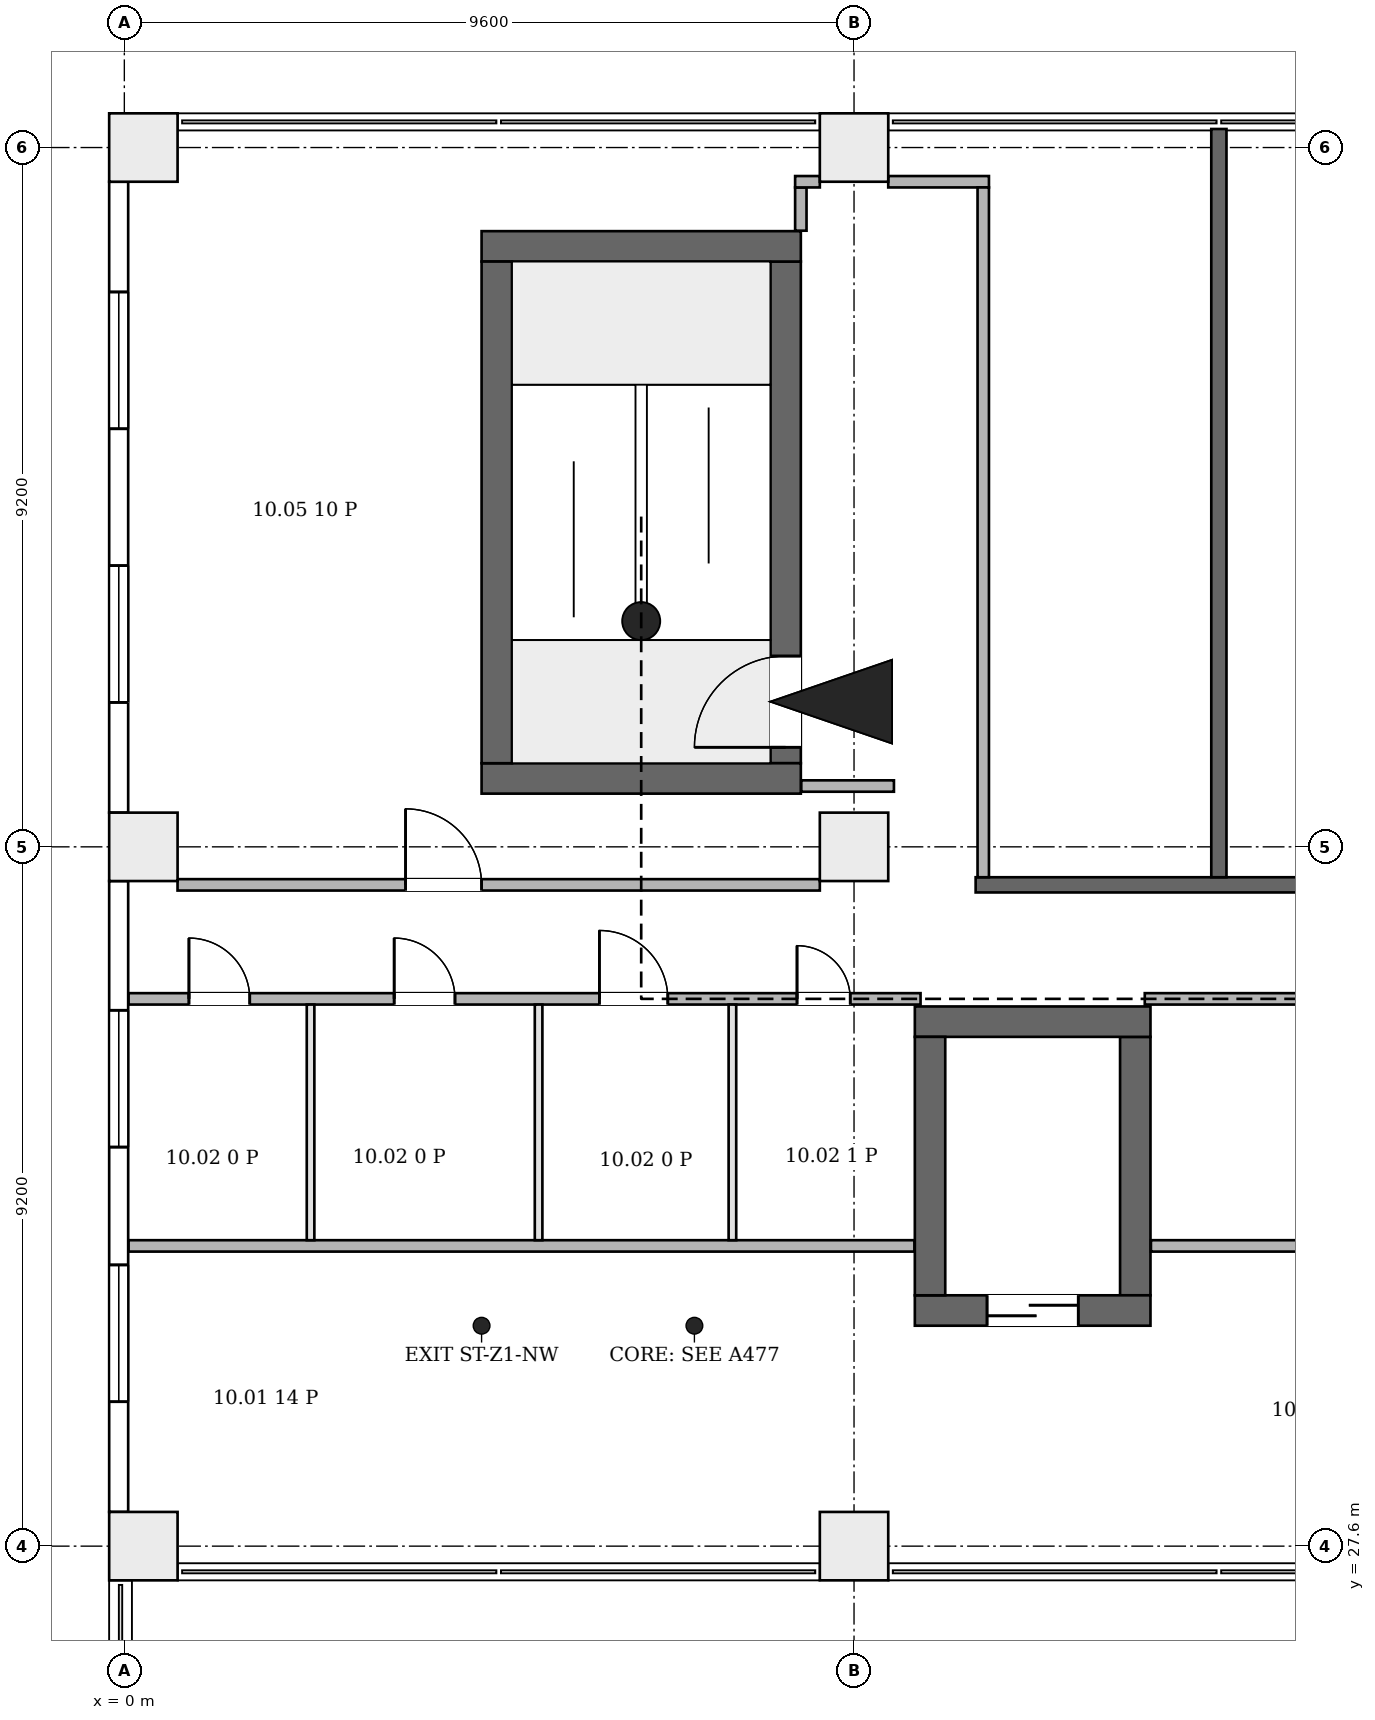
"""IFC4 building model, lengths in metres.
Left out: names, types, materials, properties, quantities, classifications, styles, units other than length and angle.
Written with IfcOpenShell. Run it as: python <this file> out.ifc"""

import sys

from ifc_helpers import new_model, si_unit, direction, frame, frame_2d, origin, origin_2d, place, context, subcontext, project, spatial, rectangle, extrude, element, fill, save


model = new_model("IFC4")
c1 = context("Model", 3, precision=1e-05, world=origin(), true_north=direction((0.0, 1.0)))
c2 = subcontext(c1, "Body", "Model", "MODEL_VIEW")
j1 = project(units=[si_unit("LENGTHUNIT", "METRE"), si_unit("PLANEANGLEUNIT", "RADIAN")], contexts=[c1])
p1 = place(None, origin())
s1 = spatial("IfcSite", under=j1, at=p1, CompositionType="ELEMENT")
p2 = place(p1, origin())
s2 = spatial("IfcBuilding", under=s1, at=p2, CompositionType="ELEMENT")
p3 = place(p2, frame((0.0, 0.0, 52.9)))
s3 = spatial("IfcBuildingStorey", under=s2, at=p3, CompositionType="ELEMENT", Elevation=52.9)
for number, where, z_axis, x_axis in (
    (1, (4.7, 37.7, 0.0), (0.0, 0.0, 1.0), (1.0, 0.0, 0.0)),
    (2, (4.7, 44.7, 0.0), (0.0, 0.0, 1.0), (1.0, 0.0, 0.0)),
):
    element("IfcWall", number, at=place(p3, frame(where, z_axis=z_axis, x_axis=x_axis)), inside=s3, PredefinedType="SHEAR", context=c2, shape_type="SweptSolid", body=[
        extrude(rectangle(XDim=4.2, YDim=0.4, at=frame_2d((2.1, 0.0))), origin(), (0.0, 0.0, 1.0), 4.2),
    ])
p4 = place(p3, frame((4.9, 37.9, 0.0), z_axis=(0.0, 0.0, 1.0), x_axis=(0.0, 1.0, 0.0)))
e3 = element("IfcWall", 3, at=p4, inside=s3, PredefinedType="SHEAR", context=c2, shape_type="SweptSolid", body=[
    extrude(rectangle(XDim=6.6, YDim=0.4, at=frame_2d((3.3, 0.0))), origin(), (0.0, 0.0, 1.0), 4.2),
])
p5 = place(p3, frame((8.7, 37.9, 0.0), z_axis=(0.0, 0.0, 1.0), x_axis=(0.0, 1.0, 0.0)))
e4 = element("IfcWall", 4, at=p5, inside=s3, PredefinedType="SHEAR", context=c2, shape_type="SweptSolid", body=[
    extrude(rectangle(XDim=6.6, YDim=0.4, at=frame_2d((3.3, 0.0))), origin(), (0.0, 0.0, 1.0), 4.2),
])
p6 = place(p5, frame((0.21, 0.0, 0.0)))
e5 = element("IfcOpeningElement", 5, at=p6, cuts=e4, PredefinedType="OPENING", context=c2, shape_type="SweptSolid", body=[
    extrude(rectangle(XDim=1.2, YDim=2.1, at=frame_2d((0.6, 1.05))), frame((0.0, 0.21, 0.0), z_axis=(0.0, -1.0, 0.0), x_axis=(1.0, 0.0, 0.0)), (0.0, 0.0, 1.0), 0.42),
])
p7 = place(p3, frame((10.4, 30.7, 0.0), z_axis=(0.0, 0.0, 1.0), x_axis=(1.0, 0.0, 0.0)))
e6 = element("IfcWall", 6, at=p7, inside=s3, PredefinedType="SHEAR", context=c2, shape_type="SweptSolid", body=[
    extrude(rectangle(XDim=3.1, YDim=0.4, at=frame_2d((1.55, 0.0))), origin(), (0.0, 0.0, 1.0), 4.2),
])
p8 = place(p7, frame((0.95, 0.0, 0.0)))
e7 = element("IfcOpeningElement", 7, at=p8, cuts=e6, PredefinedType="OPENING", context=c2, shape_type="SweptSolid", body=[
    extrude(rectangle(XDim=1.2, YDim=2.1, at=frame_2d((0.6, 1.05))), frame((0.0, 0.21, 0.0), z_axis=(0.0, -1.0, 0.0), x_axis=(1.0, 0.0, 0.0)), (0.0, 0.0, 1.0), 0.42),
])
p9 = place(p3, frame((10.4, 34.5, 0.0), z_axis=(0.0, 0.0, 1.0), x_axis=(1.0, 0.0, 0.0)))
e8 = element("IfcWall", 8, at=p9, inside=s3, PredefinedType="SHEAR", context=c2, shape_type="SweptSolid", body=[
    extrude(rectangle(XDim=3.1, YDim=0.4, at=frame_2d((1.55, 0.0))), origin(), (0.0, 0.0, 1.0), 4.2),
])
for number, where, z_axis, x_axis in (
    (9, (10.6, 30.9, 0.0), (0.0, 0.0, 1.0), (0.0, 1.0, 0.0)),
    (10, (13.3, 30.9, 0.0), (0.0, 0.0, 1.0), (0.0, 1.0, 0.0)),
):
    element("IfcWall", number, at=place(p3, frame(where, z_axis=z_axis, x_axis=x_axis)), inside=s3, PredefinedType="SHEAR", context=c2, shape_type="SweptSolid", body=[
        extrude(rectangle(XDim=3.4, YDim=0.4, at=frame_2d((1.7, 0.0))), origin(), (0.0, 0.0, 1.0), 4.2),
    ])
for number, where, z_axis, x_axis in (
    (11, (0.25, 27.6, 0.0), (0.0, 0.0, 1.0), (1.0, 0.0, 0.0)),
    (12, (9.6, 27.6, 0.0), (0.0, 0.0, 1.0), (1.0, 0.0, 0.0)),
    (13, (0.25, 36.8, 0.0), (0.0, 0.0, 1.0), (1.0, 0.0, 0.0)),
    (14, (9.6, 36.8, 0.0), (0.0, 0.0, 1.0), (1.0, 0.0, 0.0)),
    (15, (0.25, 46.0, 0.0), (0.0, 0.0, 1.0), (1.0, 0.0, 0.0)),
    (16, (9.6, 46.0, 0.0), (0.0, 0.0, 1.0), (1.0, 0.0, 0.0)),
):
    element("IfcColumn", number, at=place(p3, frame(where, z_axis=z_axis, x_axis=x_axis)), inside=s3, PredefinedType="COLUMN", context=c2, shape_type="SweptSolid", body=[
        extrude(rectangle(XDim=0.9, YDim=0.9, at=origin_2d()), origin(), (0.0, 0.0, 1.0), 4.2),
    ])
p10 = place(p3, frame((-0.074, 36.35, 0.0), z_axis=(0.0, 0.0, 1.0), x_axis=(0.0, -1.0, 0.0)))
e17 = element("IfcWall", 17, at=p10, inside=s3, PredefinedType="ELEMENTEDWALL", context=c2, shape_type="SweptSolid", body=[
    extrude(rectangle(XDim=8.3, YDim=0.25, at=frame_2d((4.15, 0.0))), origin(), (0.0, 0.0, 1.0), 3.9),
])
p11 = place(p10, frame((5.05, 0.0, 0.9)))
e18 = element("IfcOpeningElement", 18, at=p11, cuts=e17, PredefinedType="OPENING", context=c2, shape_type="SweptSolid", body=[
    extrude(rectangle(XDim=1.8, YDim=2.6, at=frame_2d((0.9, 1.3))), frame((0.0, 0.135, 0.0), z_axis=(0.0, -1.0, 0.0), x_axis=(1.0, 0.0, 0.0)), (0.0, 0.0, 1.0), 0.27),
])
p12 = place(p10, frame((1.7, 0.0, 0.9)))
e19 = element("IfcOpeningElement", 19, at=p12, cuts=e17, PredefinedType="OPENING", context=c2, shape_type="SweptSolid", body=[
    extrude(rectangle(XDim=1.8, YDim=2.6, at=frame_2d((0.9, 1.3))), frame((0.0, 0.135, 0.0), z_axis=(0.0, -1.0, 0.0), x_axis=(1.0, 0.0, 0.0)), (0.0, 0.0, 1.0), 0.27),
])
p13 = place(p3, frame((-0.074, 45.55, 0.0), z_axis=(0.0, 0.0, 1.0), x_axis=(0.0, -1.0, 0.0)))
e20 = element("IfcWall", 20, at=p13, inside=s3, PredefinedType="ELEMENTEDWALL", context=c2, shape_type="SweptSolid", body=[
    extrude(rectangle(XDim=8.3, YDim=0.25, at=frame_2d((4.15, 0.0))), origin(), (0.0, 0.0, 1.0), 3.9),
])
p14 = place(p13, frame((5.05, 0.0, 0.9)))
e21 = element("IfcOpeningElement", 21, at=p14, cuts=e20, PredefinedType="OPENING", context=c2, shape_type="SweptSolid", body=[
    extrude(rectangle(XDim=1.8, YDim=2.6, at=frame_2d((0.9, 1.3))), frame((0.0, 0.135, 0.0), z_axis=(0.0, -1.0, 0.0), x_axis=(1.0, 0.0, 0.0)), (0.0, 0.0, 1.0), 0.27),
])
p15 = place(p13, frame((1.45, 0.0, 0.9)))
e22 = element("IfcOpeningElement", 22, at=p15, cuts=e20, PredefinedType="OPENING", context=c2, shape_type="SweptSolid", body=[
    extrude(rectangle(XDim=1.8, YDim=2.6, at=frame_2d((0.9, 1.3))), frame((0.0, 0.135, 0.0), z_axis=(0.0, -1.0, 0.0), x_axis=(1.0, 0.0, 0.0)), (0.0, 0.0, 1.0), 0.27),
])
p16 = place(p3, frame((0.056, 31.55, 0.0), z_axis=(0.0, 0.0, 1.0), x_axis=(1.0, 0.0, 0.0)))
e23 = element("IfcWall", 23, at=p16, inside=s3, PredefinedType="PARTITIONING", context=c2, shape_type="SweptSolid", body=[
    extrude(rectangle(XDim=10.338, YDim=0.15, at=frame_2d((5.169, 0.0))), origin(), (0.0, 0.0, 1.0), 3.9),
])
p17 = place(p3, frame((0.056, 34.8, 0.0), z_axis=(0.0, 0.0, 1.0), x_axis=(1.0, 0.0, 0.0)))
e24 = element("IfcWall", 24, at=p17, inside=s3, PredefinedType="PARTITIONING", context=c2, shape_type="SweptSolid", body=[
    extrude(rectangle(XDim=10.419, YDim=0.15, at=frame_2d((5.209, 0.0))), origin(), (0.0, 0.0, 1.0), 3.9),
])
p18 = place(p17, frame((0.794, 0.0, 0.0)))
e25 = element("IfcOpeningElement", 25, at=p18, cuts=e24, PredefinedType="OPENING", context=c2, shape_type="SweptSolid", body=[
    extrude(rectangle(XDim=0.8, YDim=2.1, at=frame_2d((0.4, 1.05))), frame((0.0, 0.085, 0.0), z_axis=(0.0, -1.0, 0.0), x_axis=(1.0, 0.0, 0.0)), (0.0, 0.0, 1.0), 0.17),
])
p19 = place(p17, frame((3.494, 0.0, 0.0)))
e26 = element("IfcOpeningElement", 26, at=p19, cuts=e24, PredefinedType="OPENING", context=c2, shape_type="SweptSolid", body=[
    extrude(rectangle(XDim=0.8, YDim=2.1, at=frame_2d((0.4, 1.05))), frame((0.0, 0.085, 0.0), z_axis=(0.0, -1.0, 0.0), x_axis=(1.0, 0.0, 0.0)), (0.0, 0.0, 1.0), 0.17),
])
p20 = place(p17, frame((6.194, 0.0, 0.0)))
e27 = element("IfcOpeningElement", 27, at=p20, cuts=e24, PredefinedType="OPENING", context=c2, shape_type="SweptSolid", body=[
    extrude(rectangle(XDim=0.9, YDim=2.1, at=frame_2d((0.45, 1.05))), frame((0.0, 0.085, 0.0), z_axis=(0.0, -1.0, 0.0), x_axis=(1.0, 0.0, 0.0)), (0.0, 0.0, 1.0), 0.17),
])
p21 = place(p17, frame((8.794, 0.0, 0.0)))
e28 = element("IfcOpeningElement", 28, at=p21, cuts=e24, PredefinedType="OPENING", context=c2, shape_type="SweptSolid", body=[
    extrude(rectangle(XDim=0.7, YDim=2.1, at=frame_2d((0.35, 1.05))), frame((0.0, 0.085, 0.0), z_axis=(0.0, -1.0, 0.0), x_axis=(1.0, 0.0, 0.0)), (0.0, 0.0, 1.0), 0.17),
])
p22 = place(p3, frame((0.7, 36.3, 0.0), z_axis=(0.0, 0.0, 1.0), x_axis=(1.0, 0.0, 0.0)))
e29 = element("IfcWall", 29, at=p22, inside=s3, PredefinedType="PARTITIONING", context=c2, shape_type="SweptSolid", body=[
    extrude(rectangle(XDim=8.45, YDim=0.15, at=frame_2d((4.225, 0.0))), origin(), (0.0, 0.0, 1.0), 3.9),
])
p23 = place(p22, frame((3.0, 0.0, 0.0)))
e30 = element("IfcOpeningElement", 30, at=p23, cuts=e29, PredefinedType="OPENING", context=c2, shape_type="SweptSolid", body=[
    extrude(rectangle(XDim=1.0, YDim=2.1, at=frame_2d((0.5, 1.05))), frame((0.0, 0.085, 0.0), z_axis=(0.0, -1.0, 0.0), x_axis=(1.0, 0.0, 0.0)), (0.0, 0.0, 1.0), 0.17),
])
for number, where, z_axis, x_axis in (
    (31, (2.45, 31.625, 0.0), (0.0, 0.0, 1.0), (0.0, 1.0, 0.0)),
    (32, (5.45, 31.625, 0.0), (0.0, 0.0, 1.0), (0.0, 1.0, 0.0)),
    (33, (8.0, 31.625, 0.0), (0.0, 0.0, 1.0), (0.0, 1.0, 0.0)),
):
    element("IfcWall", number, at=place(p3, frame(where, z_axis=z_axis, x_axis=x_axis)), inside=s3, PredefinedType="PARTITIONING", context=c2, shape_type="SweptSolid", body=[
        extrude(rectangle(XDim=3.1, YDim=0.1, at=frame_2d((1.55, 0.0))), origin(), (0.0, 0.0, 1.0), 3.9),
    ])
p24 = place(p3, frame((8.9, 44.906, 0.0), z_axis=(0.0, 0.0, 1.0), x_axis=(0.0, 1.0, 0.0)))
e34 = element("IfcWall", 34, at=p24, inside=s3, PredefinedType="PARTITIONING", context=c2, shape_type="SweptSolid", body=[
    extrude(rectangle(XDim=0.569, YDim=0.15, at=frame_2d((0.285, 0.0))), origin(), (0.0, 0.0, 1.0), 3.9),
])
p25 = place(p3, frame((8.825, 45.55, 0.0), z_axis=(0.0, 0.0, 1.0), x_axis=(1.0, 0.0, 0.0)))
e35 = element("IfcWall", 35, at=p25, inside=s3, PredefinedType="PARTITIONING", context=c2, shape_type="SweptSolid", body=[
    extrude(rectangle(XDim=0.325, YDim=0.15, at=frame_2d((0.163, 0.0))), origin(), (0.0, 0.0, 1.0), 3.9),
])
p26 = place(p3, frame((8.906, 37.6, 0.0), z_axis=(0.0, 0.0, 1.0), x_axis=(1.0, 0.0, 0.0)))
e36 = element("IfcWall", 36, at=p26, inside=s3, PredefinedType="PARTITIONING", context=c2, shape_type="SweptSolid", body=[
    extrude(rectangle(XDim=1.219, YDim=0.15, at=frame_2d((0.609, 0.0))), origin(), (0.0, 0.0, 1.0), 3.9),
])
p27 = place(p3, frame((10.05, 45.55, 0.0), z_axis=(0.0, 0.0, 1.0), x_axis=(1.0, 0.0, 0.0)))
e37 = element("IfcWall", 37, at=p27, inside=s3, PredefinedType="PARTITIONING", context=c2, shape_type="SweptSolid", body=[
    extrude(rectangle(XDim=1.325, YDim=0.15, at=frame_2d((0.663, 0.0))), origin(), (0.0, 0.0, 1.0), 3.9),
])
p28 = place(p3, frame((11.2, 36.3, 0.0), z_axis=(0.0, 0.0, 1.0), x_axis=(1.0, 0.0, 0.0)))
e38 = element("IfcWall", 38, at=p28, inside=s3, PredefinedType="PARTITIONING", context=c2, shape_type="SweptSolid", body=[
    extrude(rectangle(XDim=7.55, YDim=0.2, at=frame_2d((3.775, 0.0))), origin(), (0.0, 0.0, 1.0), 3.9),
])
p29 = place(p28, frame((4.85, 0.0, 0.0)))
e39 = element("IfcOpeningElement", 39, at=p29, cuts=e38, PredefinedType="OPENING", context=c2, shape_type="SweptSolid", body=[
    extrude(rectangle(XDim=1.5, YDim=2.1, at=frame_2d((0.75, 1.05))), frame((0.0, 0.11, 0.0), z_axis=(0.0, -1.0, 0.0), x_axis=(1.0, 0.0, 0.0)), (0.0, 0.0, 1.0), 0.22),
])
p30 = place(p3, frame((11.3, 36.4, 0.0), z_axis=(0.0, 0.0, 1.0), x_axis=(0.0, 1.0, 0.0)))
e40 = element("IfcWall", 40, at=p30, inside=s3, PredefinedType="PARTITIONING", context=c2, shape_type="SweptSolid", body=[
    extrude(rectangle(XDim=9.075, YDim=0.15, at=frame_2d((4.538, 0.0))), origin(), (0.0, 0.0, 1.0), 3.9),
])
p31 = place(p3, frame((13.425, 34.8, 0.0), z_axis=(0.0, 0.0, 1.0), x_axis=(1.0, 0.0, 0.0)))
e41 = element("IfcWall", 41, at=p31, inside=s3, PredefinedType="PARTITIONING", context=c2, shape_type="SweptSolid", body=[
    extrude(rectangle(XDim=10.65, YDim=0.15, at=frame_2d((5.325, 0.0))), origin(), (0.0, 0.0, 1.0), 3.9),
])
p32 = place(p31, frame((2.175, 0.0, 0.0)))
e42 = element("IfcOpeningElement", 42, at=p32, cuts=e41, PredefinedType="OPENING", context=c2, shape_type="SweptSolid", body=[
    extrude(rectangle(XDim=1.0, YDim=2.1, at=frame_2d((0.5, 1.05))), frame((0.0, 0.085, 0.0), z_axis=(0.0, -1.0, 0.0), x_axis=(1.0, 0.0, 0.0)), (0.0, 0.0, 1.0), 0.17),
])
p33 = place(p31, frame((7.475, 0.0, 0.0)))
e43 = element("IfcOpeningElement", 43, at=p33, cuts=e41, PredefinedType="OPENING", context=c2, shape_type="SweptSolid", body=[
    extrude(rectangle(XDim=1.0, YDim=2.1, at=frame_2d((0.5, 1.05))), frame((0.0, 0.085, 0.0), z_axis=(0.0, -1.0, 0.0), x_axis=(1.0, 0.0, 0.0)), (0.0, 0.0, 1.0), 0.17),
])
p34 = place(p3, frame((13.506, 31.55, 0.0), z_axis=(0.0, 0.0, 1.0), x_axis=(1.0, 0.0, 0.0)))
e44 = element("IfcWall", 44, at=p34, inside=s3, PredefinedType="PARTITIONING", context=c2, shape_type="SweptSolid", body=[
    extrude(rectangle(XDim=10.569, YDim=0.15, at=frame_2d((5.284, 0.0))), origin(), (0.0, 0.0, 1.0), 3.9),
])
p35 = place(p3, frame((14.4, 36.4, 0.0), z_axis=(0.0, 0.0, 1.0), x_axis=(0.0, 1.0, 0.0)))
e45 = element("IfcWall", 45, at=p35, inside=s3, PredefinedType="PARTITIONING", context=c2, shape_type="SweptSolid", body=[
    extrude(rectangle(XDim=9.844, YDim=0.2, at=frame_2d((4.922, 0.0))), origin(), (0.0, 0.0, 1.0), 3.9),
])
p36 = place(p11, origin())
e46 = element("IfcWindow", 46, at=p36, inside=s3, PartitioningType="SINGLE_PANEL", PredefinedType="WINDOW", context=c2, shape_type="SweptSolid", body=[
    extrude(rectangle(XDim=1.8, YDim=2.6, at=frame_2d((0.9, 1.3))), frame((0.0, 0.03, 0.0), z_axis=(0.0, -1.0, 0.0), x_axis=(1.0, 0.0, 0.0)), (0.0, 0.0, 1.0), 0.06),
])
fill(e18, e46)
p37 = place(p12, origin())
e47 = element("IfcWindow", 47, at=p37, inside=s3, PartitioningType="SINGLE_PANEL", PredefinedType="WINDOW", context=c2, shape_type="SweptSolid", body=[
    extrude(rectangle(XDim=1.8, YDim=2.6, at=frame_2d((0.9, 1.3))), frame((0.0, 0.03, 0.0), z_axis=(0.0, -1.0, 0.0), x_axis=(1.0, 0.0, 0.0)), (0.0, 0.0, 1.0), 0.06),
])
fill(e19, e47)
p38 = place(p14, origin())
e48 = element("IfcWindow", 48, at=p38, inside=s3, PartitioningType="SINGLE_PANEL", PredefinedType="WINDOW", context=c2, shape_type="SweptSolid", body=[
    extrude(rectangle(XDim=1.8, YDim=2.6, at=frame_2d((0.9, 1.3))), frame((0.0, 0.03, 0.0), z_axis=(0.0, -1.0, 0.0), x_axis=(1.0, 0.0, 0.0)), (0.0, 0.0, 1.0), 0.06),
])
fill(e21, e48)
p39 = place(p15, origin())
e49 = element("IfcWindow", 49, at=p39, inside=s3, PartitioningType="SINGLE_PANEL", PredefinedType="WINDOW", context=c2, shape_type="SweptSolid", body=[
    extrude(rectangle(XDim=1.8, YDim=2.6, at=frame_2d((0.9, 1.3))), frame((0.0, 0.03, 0.0), z_axis=(0.0, -1.0, 0.0), x_axis=(1.0, 0.0, 0.0)), (0.0, 0.0, 1.0), 0.06),
])
fill(e22, e49)
p40 = place(p6, origin())
e50 = element("IfcDoor", 50, at=p40, inside=s3, OperationType="SINGLE_SWING_RIGHT", PredefinedType="DOOR", context=c2, shape_type="SweptSolid", body=[
    extrude(rectangle(XDim=1.2, YDim=2.1, at=frame_2d((0.6, 1.05))), frame((0.0, 0.025, 0.0), z_axis=(0.0, -1.0, 0.0), x_axis=(1.0, 0.0, 0.0)), (0.0, 0.0, 1.0), 0.05),
])
fill(e5, e50)
p41 = place(p8, origin())
e51 = element("IfcDoor", 51, at=p41, inside=s3, OperationType="DOUBLE_DOOR_SLIDING", PredefinedType="DOOR", context=c2, shape_type="SweptSolid", body=[
    extrude(rectangle(XDim=1.2, YDim=2.1, at=frame_2d((0.6, 1.05))), frame((0.0, 0.025, 0.0), z_axis=(0.0, -1.0, 0.0), x_axis=(1.0, 0.0, 0.0)), (0.0, 0.0, 1.0), 0.05),
])
fill(e7, e51)
p42 = place(p18, origin())
e52 = element("IfcDoor", 52, at=p42, inside=s3, OperationType="SINGLE_SWING_RIGHT", PredefinedType="DOOR", context=c2, shape_type="SweptSolid", body=[
    extrude(rectangle(XDim=0.8, YDim=2.1, at=frame_2d((0.4, 1.05))), frame((0.0, 0.025, 0.0), z_axis=(0.0, -1.0, 0.0), x_axis=(1.0, 0.0, 0.0)), (0.0, 0.0, 1.0), 0.05),
])
fill(e25, e52)
p43 = place(p19, origin())
e53 = element("IfcDoor", 53, at=p43, inside=s3, OperationType="SINGLE_SWING_LEFT", PredefinedType="DOOR", context=c2, shape_type="SweptSolid", body=[
    extrude(rectangle(XDim=0.8, YDim=2.1, at=frame_2d((0.4, 1.05))), frame((0.0, 0.025, 0.0), z_axis=(0.0, -1.0, 0.0), x_axis=(1.0, 0.0, 0.0)), (0.0, 0.0, 1.0), 0.05),
])
fill(e26, e53)
p44 = place(p20, origin())
e54 = element("IfcDoor", 54, at=p44, inside=s3, OperationType="SINGLE_SWING_LEFT", PredefinedType="DOOR", context=c2, shape_type="SweptSolid", body=[
    extrude(rectangle(XDim=0.9, YDim=2.1, at=frame_2d((0.45, 1.05))), frame((0.0, 0.025, 0.0), z_axis=(0.0, -1.0, 0.0), x_axis=(1.0, 0.0, 0.0)), (0.0, 0.0, 1.0), 0.05),
])
fill(e27, e54)
p45 = place(p21, origin())
e55 = element("IfcDoor", 55, at=p45, inside=s3, OperationType="SINGLE_SWING_LEFT", PredefinedType="DOOR", context=c2, shape_type="SweptSolid", body=[
    extrude(rectangle(XDim=0.7, YDim=2.1, at=frame_2d((0.35, 1.05))), frame((0.0, 0.025, 0.0), z_axis=(0.0, -1.0, 0.0), x_axis=(1.0, 0.0, 0.0)), (0.0, 0.0, 1.0), 0.05),
])
fill(e28, e55)
p46 = place(p23, origin())
e56 = element("IfcDoor", 56, at=p46, inside=s3, OperationType="SINGLE_SWING_RIGHT", PredefinedType="DOOR", context=c2, shape_type="SweptSolid", body=[
    extrude(rectangle(XDim=1.0, YDim=2.1, at=frame_2d((0.5, 1.05))), frame((0.0, 0.025, 0.0), z_axis=(0.0, -1.0, 0.0), x_axis=(1.0, 0.0, 0.0)), (0.0, 0.0, 1.0), 0.05),
])
fill(e30, e56)
save(model, sys.argv[1])
